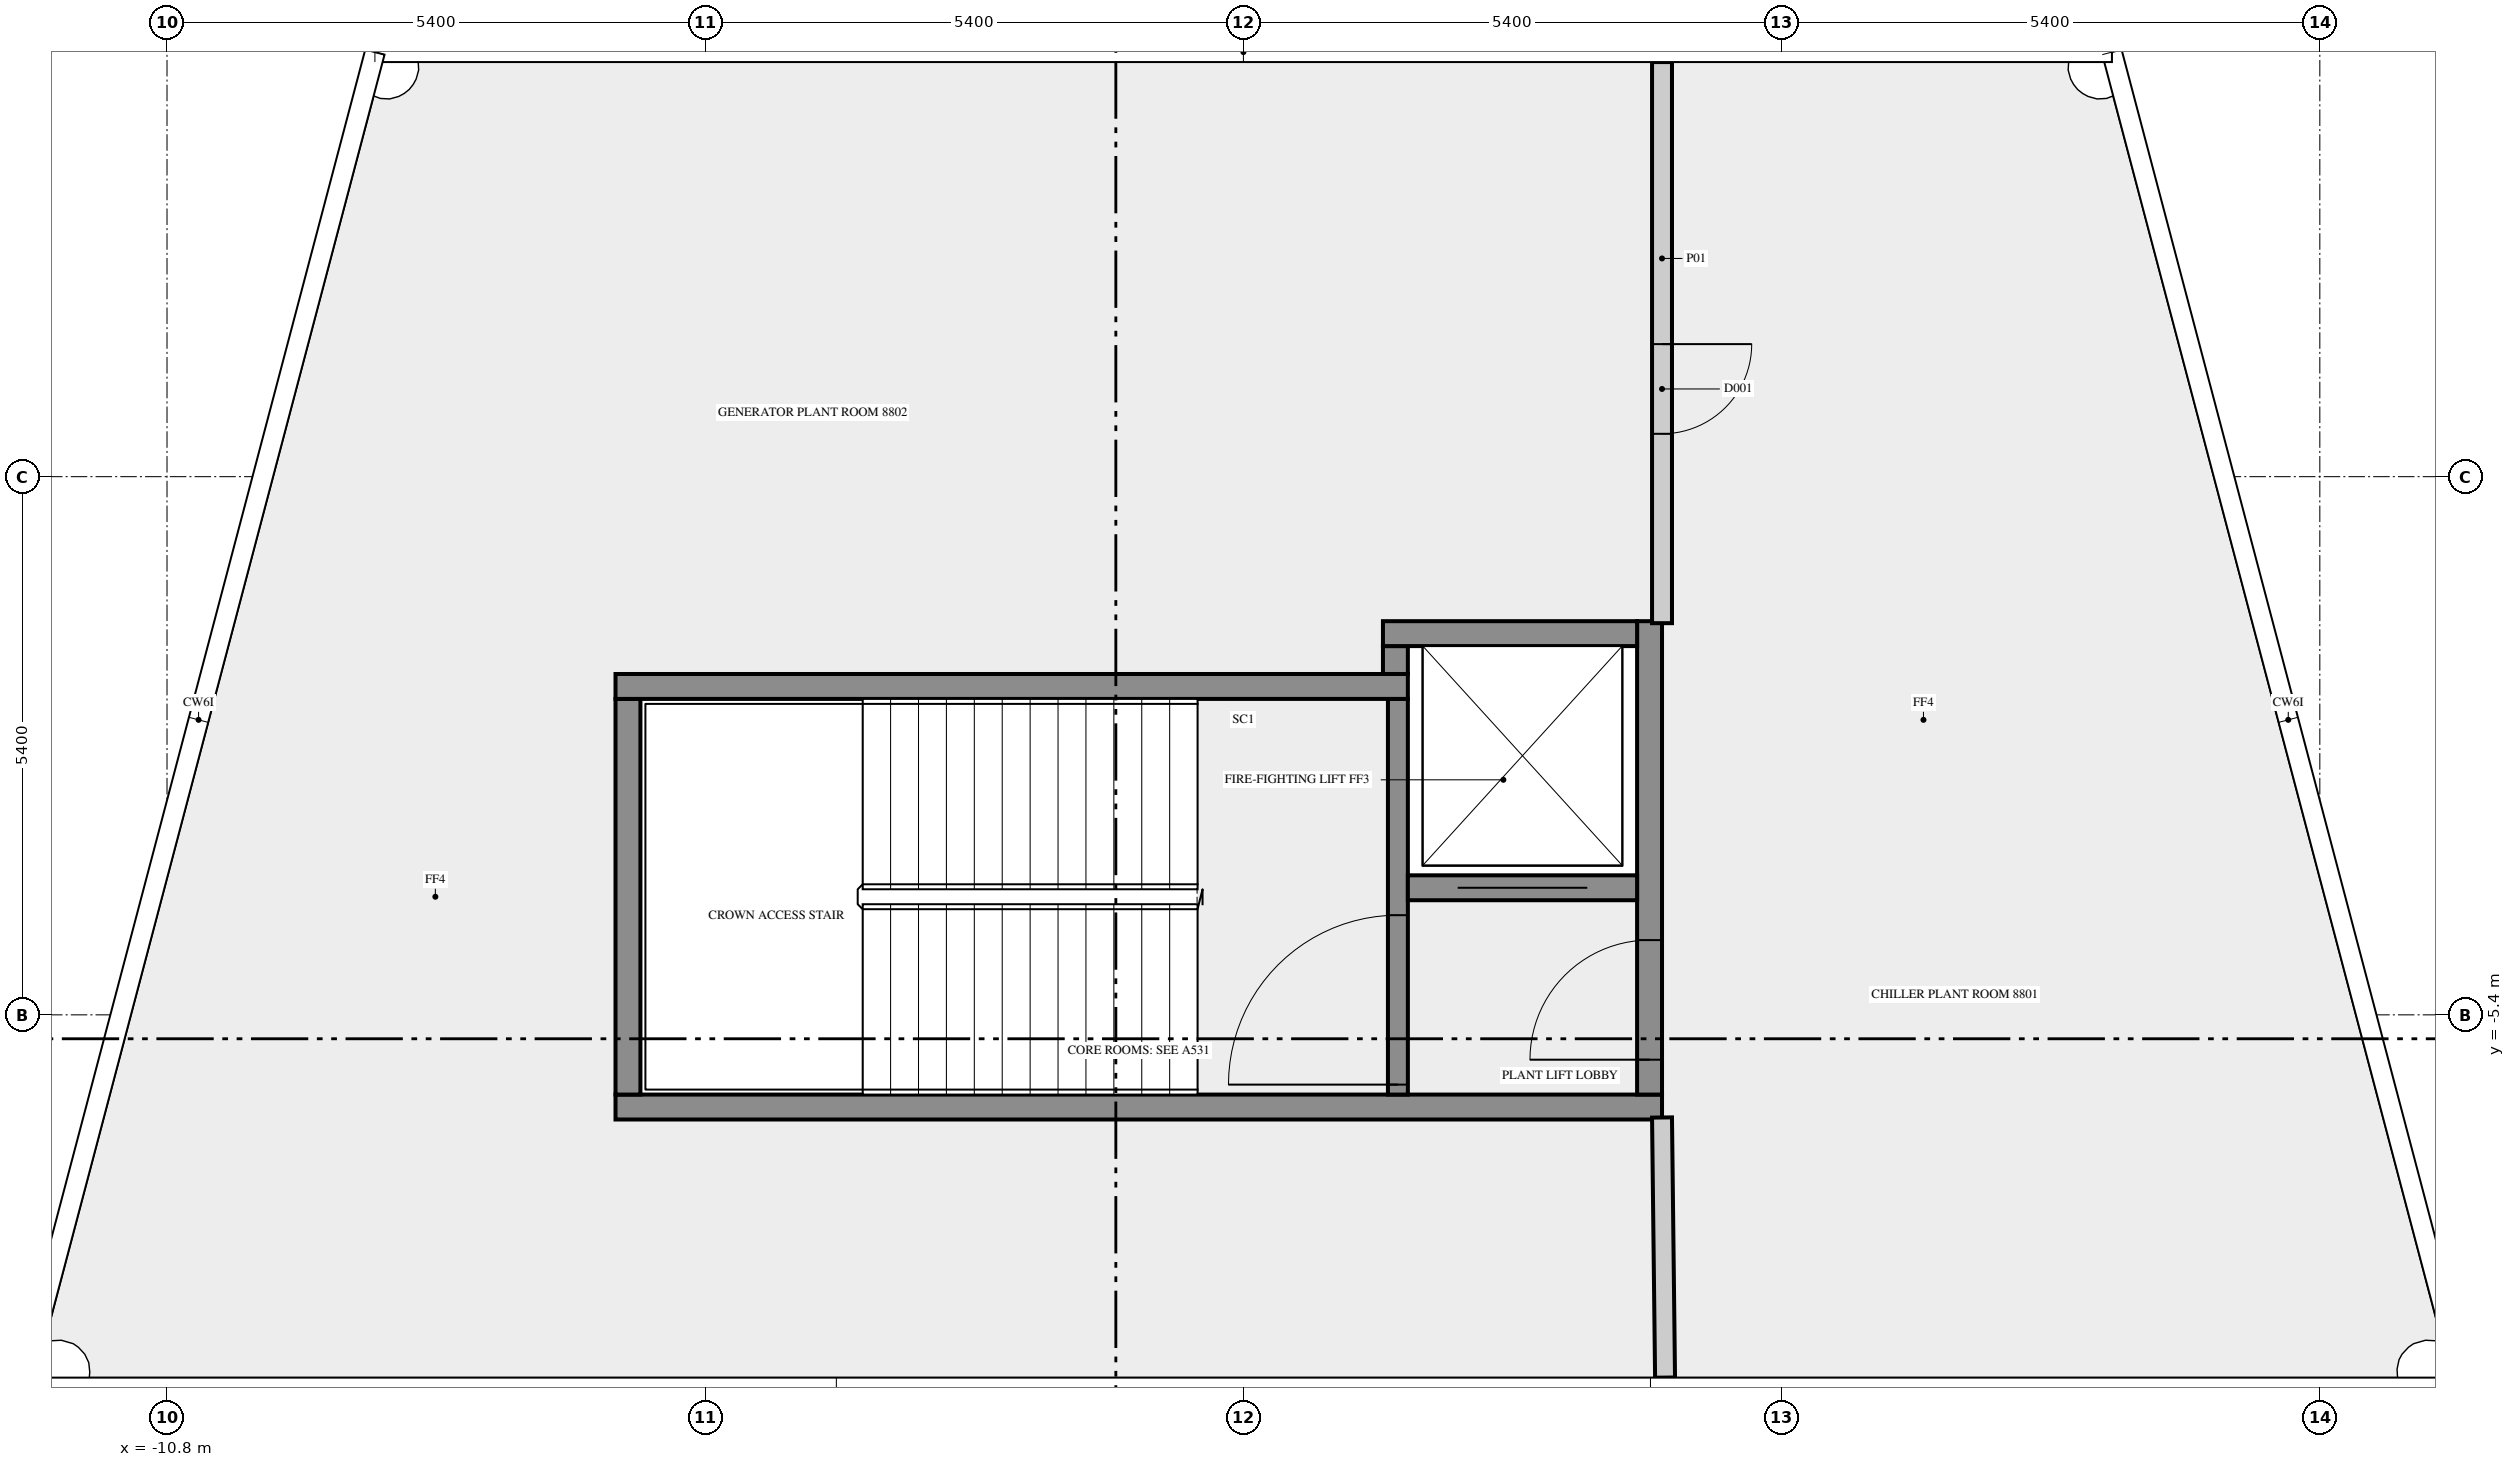
"""IFC4 building model, lengths in metres.
Left out: names, types, materials, properties, quantities, classifications, styles, units other than length and angle.
Written with IfcOpenShell. Run it as: python <this file> out.ifc"""

import sys

from ifc_helpers import new_model, si_unit, direction, frame, frame_2d, origin, place, context, subcontext, project, spatial, rectangle, extrude, element, fill, save


model = new_model("IFC4")
c1 = context("Model", 3, precision=1e-05, world=origin(), true_north=direction((0.0, 1.0)))
c2 = subcontext(c1, "Body", "Model", "MODEL_VIEW")
j1 = project(units=[si_unit("LENGTHUNIT", "METRE"), si_unit("PLANEANGLEUNIT", "RADIAN")], contexts=[c1])
p1 = place(None, origin())
s1 = spatial("IfcSite", under=j1, at=p1, CompositionType="ELEMENT")
p2 = place(p1, origin())
s2 = spatial("IfcBuilding", under=s1, at=p2, CompositionType="ELEMENT")
p3 = place(p2, frame((0.0, 0.0, 380.0)))
s3 = spatial("IfcBuildingStorey", under=s2, at=p3, CompositionType="ELEMENT", Elevation=380.0)
p4 = place(p3, frame((-6.3, -6.325, 0.0), z_axis=(0.0, 0.0, 1.0), x_axis=(1.0, 0.0, 0.0)))
e1 = element("IfcWall", 1, at=p4, inside=s3, PredefinedType="SHEAR", context=c2, shape_type="SweptSolid", body=[
    extrude(rectangle(XDim=10.5, YDim=0.25, at=frame_2d((5.25, 0.0))), origin(), (0.0, 0.0, 1.0), 3.75),
])
p5 = place(p3, frame((-6.175, -6.2, 0.0), z_axis=(0.0, 0.0, 1.0), x_axis=(0.0, 1.0, 0.0)))
e2 = element("IfcWall", 2, at=p5, inside=s3, PredefinedType="SHEAR", context=c2, shape_type="SweptSolid", body=[
    extrude(rectangle(XDim=3.97, YDim=0.25, at=frame_2d((1.985, 0.0))), origin(), (0.0, 0.0, 1.0), 3.75),
])
p6 = place(p3, frame((1.55, -6.2, 0.0), z_axis=(0.0, 0.0, 1.0), x_axis=(0.0, 1.0, 0.0)))
e3 = element("IfcWall", 3, at=p6, inside=s3, PredefinedType="SHEAR", context=c2, shape_type="SweptSolid", body=[
    extrude(rectangle(XDim=3.97, YDim=0.2, at=frame_2d((1.985, 0.0))), origin(), (0.0, 0.0, 1.0), 3.75),
])
p7 = place(p6, frame((0.1, 0.0, 0.0)))
e4 = element("IfcOpeningElement", 4, at=p7, cuts=e3, PredefinedType="OPENING", context=c2, shape_type="SweptSolid", body=[
    extrude(rectangle(XDim=1.7, YDim=2.1, at=frame_2d((0.85, 1.05))), frame((0.0, 0.11, 0.0), z_axis=(0.0, -1.0, 0.0), x_axis=(1.0, 0.0, 0.0)), (0.0, 0.0, 1.0), 0.22),
])
p8 = place(p3, frame((4.075, -6.2, 0.0), z_axis=(0.0, 0.0, 1.0), x_axis=(0.0, 1.0, 0.0)))
e5 = element("IfcWall", 5, at=p8, inside=s3, PredefinedType="SHEAR", context=c2, shape_type="SweptSolid", body=[
    extrude(rectangle(XDim=4.75, YDim=0.25, at=frame_2d((2.375, 0.0))), origin(), (0.0, 0.0, 1.0), 3.75),
])
p9 = place(p8, frame((0.35, 0.0, 0.0)))
e6 = element("IfcOpeningElement", 6, at=p9, cuts=e5, PredefinedType="OPENING", context=c2, shape_type="SweptSolid", body=[
    extrude(rectangle(XDim=1.2, YDim=2.1, at=frame_2d((0.6, 1.05))), frame((0.0, 0.135, 0.0), z_axis=(0.0, -1.0, 0.0), x_axis=(1.0, 0.0, 0.0)), (0.0, 0.0, 1.0), 0.27),
])
p10 = place(p3, frame((1.65, -4.125, 0.0), z_axis=(0.0, 0.0, 1.0), x_axis=(1.0, 0.0, 0.0)))
e7 = element("IfcWall", 7, at=p10, inside=s3, PredefinedType="SHEAR", context=c2, shape_type="SweptSolid", body=[
    extrude(rectangle(XDim=2.3, YDim=0.25, at=frame_2d((1.15, 0.0))), origin(), (0.0, 0.0, 1.0), 3.75),
])
p11 = place(p10, frame((0.5, 0.0, 0.0)))
e8 = element("IfcOpeningElement", 8, at=p11, cuts=e7, PredefinedType="OPENING", context=c2, shape_type="SweptSolid", body=[
    extrude(rectangle(XDim=1.3, YDim=2.1, at=frame_2d((0.65, 1.05))), frame((0.0, 0.135, 0.0), z_axis=(0.0, -1.0, 0.0), x_axis=(1.0, 0.0, 0.0)), (0.0, 0.0, 1.0), 0.27),
])
p12 = place(p3, frame((-6.3, -2.105, 0.0), z_axis=(0.0, 0.0, 1.0), x_axis=(1.0, 0.0, 0.0)))
e9 = element("IfcWall", 9, at=p12, inside=s3, PredefinedType="SHEAR", context=c2, shape_type="SweptSolid", body=[
    extrude(rectangle(XDim=7.95, YDim=0.25, at=frame_2d((3.975, 0.0))), origin(), (0.0, 0.0, 1.0), 3.75),
])
p13 = place(p3, frame((1.525, -1.98, 0.0), z_axis=(0.0, 0.0, 1.0), x_axis=(0.0, 1.0, 0.0)))
e10 = element("IfcWall", 10, at=p13, inside=s3, PredefinedType="SHEAR", context=c2, shape_type="SweptSolid", body=[
    extrude(rectangle(XDim=0.28, YDim=0.25, at=frame_2d((0.14, 0.0))), origin(), (0.0, 0.0, 1.0), 3.75),
])
p14 = place(p3, frame((1.4, -1.575, 0.0), z_axis=(0.0, 0.0, 1.0), x_axis=(1.0, 0.0, 0.0)))
e11 = element("IfcWall", 11, at=p14, inside=s3, PredefinedType="SHEAR", context=c2, shape_type="SweptSolid", body=[
    extrude(rectangle(XDim=2.55, YDim=0.25, at=frame_2d((1.275, 0.0))), origin(), (0.0, 0.0, 1.0), 3.75),
])
p15 = place(p3, frame((4.2, 4.16, 0.0), z_axis=(0.0, 0.0, 1.0), x_axis=(0.0, -1.0, 0.0)))
e12 = element("IfcWall", 12, at=p15, inside=s3, PredefinedType="SOLIDWALL", context=c2, shape_type="SweptSolid", body=[
    extrude(rectangle(XDim=5.63, YDim=0.2, at=frame_2d((2.815, 0.0))), origin(), (0.0, 0.0, 1.0), 2.838),
])
p16 = place(p15, frame((2.83, 0.0, 0.0)))
e13 = element("IfcOpeningElement", 13, at=p16, cuts=e12, PredefinedType="OPENING", context=c2, shape_type="SweptSolid", body=[
    extrude(rectangle(XDim=0.9, YDim=2.1, at=frame_2d((0.45, 1.05))), frame((0.0, 0.11, 0.0), z_axis=(0.0, -1.0, 0.0), x_axis=(1.0, 0.0, 0.0)), (0.0, 0.0, 1.0), 0.22),
])
p17 = place(p3, frame((4.2, -6.43, 0.0), z_axis=(0.0, 0.0, 1.0), x_axis=(0.011692371865, -0.999931641884, 0.0)))
e14 = element("IfcWall", 14, at=p17, inside=s3, PredefinedType="SOLIDWALL", context=c2, shape_type="SweptSolid", body=[
    extrude(rectangle(XDim=2.61, YDim=0.2, at=frame_2d((1.305, 0.0))), origin(), (0.0, 0.0, 1.0), 2.838),
])
p18 = place(p7, origin())
e15 = element("IfcDoor", 15, at=p18, inside=s3, OperationType="DOUBLE_DOOR_SINGLE_SWING", PredefinedType="DOOR", context=c2, shape_type="SweptSolid", body=[
    extrude(rectangle(XDim=1.7, YDim=2.1, at=frame_2d((0.85, 1.05))), frame((0.0, 0.025, 0.0), z_axis=(0.0, -1.0, 0.0), x_axis=(1.0, 0.0, 0.0)), (0.0, 0.0, 1.0), 0.05),
])
fill(e4, e15)
p19 = place(p9, origin())
e16 = element("IfcDoor", 16, at=p19, inside=s3, OperationType="SINGLE_SWING_LEFT", PredefinedType="DOOR", context=c2, shape_type="SweptSolid", body=[
    extrude(rectangle(XDim=1.2, YDim=2.1, at=frame_2d((0.6, 1.05))), frame((0.0, 0.025, 0.0), z_axis=(0.0, -1.0, 0.0), x_axis=(1.0, 0.0, 0.0)), (0.0, 0.0, 1.0), 0.05),
])
fill(e6, e16)
p20 = place(p11, origin())
e17 = element("IfcDoor", 17, at=p20, inside=s3, OperationType="DOUBLE_DOOR_SLIDING", PredefinedType="DOOR", context=c2, shape_type="SweptSolid", body=[
    extrude(rectangle(XDim=1.3, YDim=2.1, at=frame_2d((0.65, 1.05))), frame((0.0, 0.025, 0.0), z_axis=(0.0, -1.0, 0.0), x_axis=(1.0, 0.0, 0.0)), (0.0, 0.0, 1.0), 0.05),
])
fill(e8, e17)
p21 = place(p16, origin())
e18 = element("IfcDoor", 18, at=p21, inside=s3, OperationType="SINGLE_SWING_LEFT", PredefinedType="DOOR", context=c2, shape_type="SweptSolid", body=[
    extrude(rectangle(XDim=0.9, YDim=2.1, at=frame_2d((0.45, 1.05))), frame((0.0, 0.025, 0.0), z_axis=(0.0, -1.0, 0.0), x_axis=(1.0, 0.0, 0.0)), (0.0, 0.0, 1.0), 0.05),
])
fill(e13, e18)
save(model, sys.argv[1])
